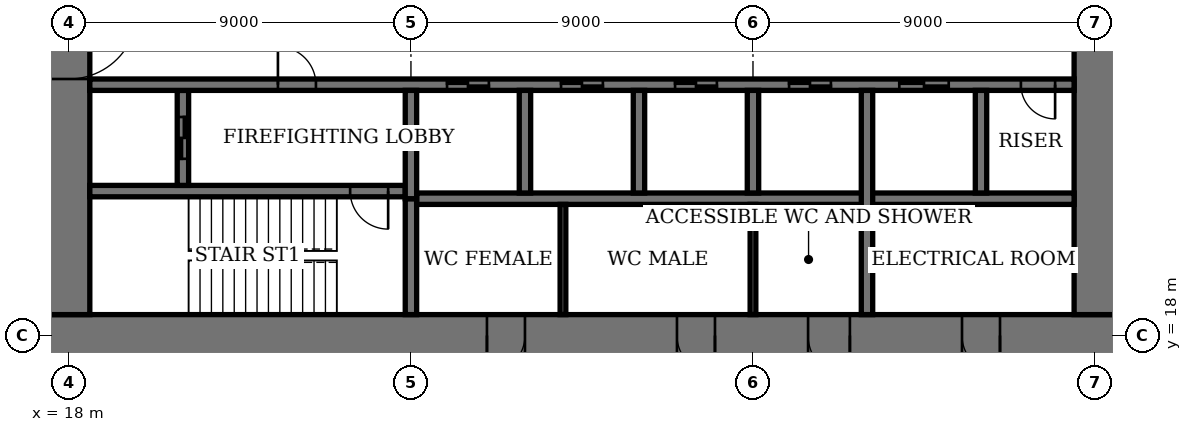
"""IFC4 building model, lengths in metres.
Left out: names, types, materials, properties, quantities, classifications, styles, units other than length and angle.
Written with IfcOpenShell. Run it as: python <this file> out.ifc"""

import sys

from ifc_helpers import new_model, si_unit, direction, frame, frame_2d, origin, place, context, subcontext, project, spatial, rectangle, extrude, element, fill, save


model = new_model("IFC4")
c1 = context("Model", 3, precision=1e-05, world=origin(), true_north=direction((0.0, 1.0)))
c2 = subcontext(c1, "Body", "Model", "MODEL_VIEW")
j1 = project(units=[si_unit("LENGTHUNIT", "METRE"), si_unit("PLANEANGLEUNIT", "RADIAN")], contexts=[c1])
p1 = place(None, origin())
s1 = spatial("IfcSite", under=j1, at=p1, CompositionType="ELEMENT")
p2 = place(p1, origin())
s2 = spatial("IfcBuilding", under=s1, at=p2, CompositionType="ELEMENT")
p3 = place(p2, frame((0.0, 0.0, 239.4)))
s3 = spatial("IfcBuildingStorey", under=s2, at=p3, CompositionType="ELEMENT", Elevation=239.4)
p4 = place(p3, frame((17.45, 18.0, 0.0), z_axis=(0.0, 0.0, 1.0), x_axis=(1.0, 0.0, 0.0)))
e1 = element("IfcWall", 1, at=p4, inside=s3, PredefinedType="SHEAR", context=c2, shape_type="SweptSolid", body=[
    extrude(rectangle(XDim=28.1, YDim=1.1, at=frame_2d((14.05, 0.0))), origin(), (0.0, 0.0, 1.0), 4.0),
])
p5 = place(p4, frame((11.55, 0.0, 0.0)))
e2 = element("IfcOpeningElement", 2, at=p5, cuts=e1, PredefinedType="OPENING", context=c2, shape_type="SweptSolid", body=[
    extrude(rectangle(XDim=1.0, YDim=2.4, at=frame_2d((0.5, 1.2))), frame((0.0, 0.56, 0.0), z_axis=(0.0, -1.0, 0.0), x_axis=(1.0, 0.0, 0.0)), (0.0, 0.0, 1.0), 1.12),
])
p6 = place(p4, frame((16.55, 0.0, 0.0)))
e3 = element("IfcOpeningElement", 3, at=p6, cuts=e1, PredefinedType="OPENING", context=c2, shape_type="SweptSolid", body=[
    extrude(rectangle(XDim=1.0, YDim=2.4, at=frame_2d((0.5, 1.2))), frame((0.0, 0.56, 0.0), z_axis=(0.0, -1.0, 0.0), x_axis=(1.0, 0.0, 0.0)), (0.0, 0.0, 1.0), 1.12),
])
p7 = place(p4, frame((20.0, 0.0, 0.0)))
e4 = element("IfcOpeningElement", 4, at=p7, cuts=e1, PredefinedType="OPENING", context=c2, shape_type="SweptSolid", body=[
    extrude(rectangle(XDim=1.1, YDim=2.4, at=frame_2d((0.55, 1.2))), frame((0.0, 0.56, 0.0), z_axis=(0.0, -1.0, 0.0), x_axis=(1.0, 0.0, 0.0)), (0.0, 0.0, 1.0), 1.12),
])
p8 = place(p4, frame((24.05, 0.0, 0.0)))
e5 = element("IfcOpeningElement", 5, at=p8, cuts=e1, PredefinedType="OPENING", context=c2, shape_type="SweptSolid", body=[
    extrude(rectangle(XDim=1.0, YDim=2.4, at=frame_2d((0.5, 1.2))), frame((0.0, 0.56, 0.0), z_axis=(0.0, -1.0, 0.0), x_axis=(1.0, 0.0, 0.0)), (0.0, 0.0, 1.0), 1.12),
])
p9 = place(p3, frame((18.0, 35.45, 0.0), z_axis=(0.0, 0.0, 1.0), x_axis=(0.0, -1.0, 0.0)))
e6 = element("IfcWall", 6, at=p9, inside=s3, PredefinedType="SHEAR", context=c2, shape_type="SweptSolid", body=[
    extrude(rectangle(XDim=16.9, YDim=1.1, at=frame_2d((8.45, 0.0))), origin(), (0.0, 0.0, 1.0), 4.0),
])
p10 = place(p9, frame((8.9, 0.0, 0.0)))
e7 = element("IfcOpeningElement", 7, at=p10, cuts=e6, PredefinedType="OPENING", context=c2, shape_type="SweptSolid", body=[
    extrude(rectangle(XDim=1.8, YDim=2.4, at=frame_2d((0.9, 1.2))), frame((0.0, 0.56, 0.0), z_axis=(0.0, -1.0, 0.0), x_axis=(1.0, 0.0, 0.0)), (0.0, 0.0, 1.0), 1.12),
])
p11 = place(p3, frame((45.0, 18.55, 0.0), z_axis=(0.0, 0.0, 1.0), x_axis=(0.0, 1.0, 0.0)))
e8 = element("IfcWall", 8, at=p11, inside=s3, PredefinedType="SHEAR", context=c2, shape_type="SweptSolid", body=[
    extrude(rectangle(XDim=16.9, YDim=1.1, at=frame_2d((8.45, 0.0))), origin(), (0.0, 0.0, 1.0), 4.0),
])
p12 = place(p11, frame((8.9, 0.0, 0.0)))
e9 = element("IfcOpeningElement", 9, at=p12, cuts=e8, PredefinedType="OPENING", context=c2, shape_type="SweptSolid", body=[
    extrude(rectangle(XDim=1.8, YDim=2.4, at=frame_2d((0.9, 1.2))), frame((0.0, 0.56, 0.0), z_axis=(0.0, -1.0, 0.0), x_axis=(1.0, 0.0, 0.0)), (0.0, 0.0, 1.0), 1.12),
])
p13 = place(p3, frame((18.55, 21.8, 0.0), z_axis=(0.0, 0.0, 1.0), x_axis=(1.0, 0.0, 0.0)))
e10 = element("IfcWall", 10, at=p13, inside=s3, PredefinedType="SHEAR", context=c2, shape_type="SweptSolid", body=[
    extrude(rectangle(XDim=8.3, YDim=0.3, at=frame_2d((4.15, 0.0))), origin(), (0.0, 0.0, 1.0), 4.0),
])
p14 = place(p13, frame((6.85, 0.0, 0.0)))
e11 = element("IfcOpeningElement", 11, at=p14, cuts=e10, PredefinedType="OPENING", context=c2, shape_type="SweptSolid", body=[
    extrude(rectangle(XDim=1.0, YDim=2.4, at=frame_2d((0.5, 1.2))), frame((0.0, 0.16, 0.0), z_axis=(0.0, -1.0, 0.0), x_axis=(1.0, 0.0, 0.0)), (0.0, 0.0, 1.0), 0.32),
])
p15 = place(p3, frame((27.0, 18.55, 0.0), z_axis=(0.0, 0.0, 1.0), x_axis=(0.0, 1.0, 0.0)))
e12 = element("IfcWall", 12, at=p15, inside=s3, PredefinedType="SHEAR", context=c2, shape_type="SweptSolid", body=[
    extrude(rectangle(XDim=3.05, YDim=0.3, at=frame_2d((1.525, 0.0))), origin(), (0.0, 0.0, 1.0), 4.0),
])
p16 = place(p3, frame((21.0, 21.95, 0.0), z_axis=(0.0, 0.0, 1.0), x_axis=(0.0, 1.0, 0.0)))
e13 = element("IfcWall", 13, at=p16, inside=s3, PredefinedType="SHEAR", context=c2, shape_type="SweptSolid", body=[
    extrude(rectangle(XDim=2.5, YDim=0.3, at=frame_2d((1.25, 0.0))), origin(), (0.0, 0.0, 1.0), 4.0),
])
p17 = place(p16, frame((0.7, 0.0, 0.0)))
e14 = element("IfcOpeningElement", 14, at=p17, cuts=e13, PredefinedType="OPENING", context=c2, shape_type="SweptSolid", body=[
    extrude(rectangle(XDim=1.1, YDim=2.4, at=frame_2d((0.55, 1.2))), frame((0.0, 0.16, 0.0), z_axis=(0.0, -1.0, 0.0), x_axis=(1.0, 0.0, 0.0)), (0.0, 0.0, 1.0), 0.32),
])
p18 = place(p3, frame((18.55, 24.6, 0.0), z_axis=(0.0, 0.0, 1.0), x_axis=(1.0, 0.0, 0.0)))
e15 = element("IfcWall", 15, at=p18, inside=s3, PredefinedType="SHEAR", context=c2, shape_type="SweptSolid", body=[
    extrude(rectangle(XDim=25.9, YDim=0.3, at=frame_2d((12.95, 0.0))), origin(), (0.0, 0.0, 1.0), 4.0),
])
p19 = place(p18, frame((4.95, 0.0, 0.0)))
e16 = element("IfcOpeningElement", 16, at=p19, cuts=e15, PredefinedType="OPENING", context=c2, shape_type="SweptSolid", body=[
    extrude(rectangle(XDim=1.0, YDim=2.4, at=frame_2d((0.5, 1.2))), frame((0.0, 0.16, 0.0), z_axis=(0.0, -1.0, 0.0), x_axis=(1.0, 0.0, 0.0)), (0.0, 0.0, 1.0), 0.32),
])
p20 = place(p18, frame((24.5, 0.0, 0.0)))
e17 = element("IfcOpeningElement", 17, at=p20, cuts=e15, PredefinedType="OPENING", context=c2, shape_type="SweptSolid", body=[
    extrude(rectangle(XDim=0.9, YDim=2.1, at=frame_2d((0.45, 1.05))), frame((0.0, 0.16, 0.0), z_axis=(0.0, -1.0, 0.0), x_axis=(1.0, 0.0, 0.0)), (0.0, 0.0, 1.0), 0.32),
])
p21 = place(p18, frame((9.4, 0.0, 0.0)))
e18 = element("IfcOpeningElement", 18, at=p21, cuts=e15, PredefinedType="OPENING", context=c2, shape_type="SweptSolid", body=[
    extrude(rectangle(XDim=1.1, YDim=2.4, at=frame_2d((0.55, 1.2))), frame((0.0, 0.16, 0.0), z_axis=(0.0, -1.0, 0.0), x_axis=(1.0, 0.0, 0.0)), (0.0, 0.0, 1.0), 0.32),
])
p22 = place(p18, frame((12.4, 0.0, 0.0)))
e19 = element("IfcOpeningElement", 19, at=p22, cuts=e15, PredefinedType="OPENING", context=c2, shape_type="SweptSolid", body=[
    extrude(rectangle(XDim=1.1, YDim=2.4, at=frame_2d((0.55, 1.2))), frame((0.0, 0.16, 0.0), z_axis=(0.0, -1.0, 0.0), x_axis=(1.0, 0.0, 0.0)), (0.0, 0.0, 1.0), 0.32),
])
p23 = place(p18, frame((15.4, 0.0, 0.0)))
e20 = element("IfcOpeningElement", 20, at=p23, cuts=e15, PredefinedType="OPENING", context=c2, shape_type="SweptSolid", body=[
    extrude(rectangle(XDim=1.1, YDim=2.4, at=frame_2d((0.55, 1.2))), frame((0.0, 0.16, 0.0), z_axis=(0.0, -1.0, 0.0), x_axis=(1.0, 0.0, 0.0)), (0.0, 0.0, 1.0), 0.32),
])
p24 = place(p18, frame((18.4, 0.0, 0.0)))
e21 = element("IfcOpeningElement", 21, at=p24, cuts=e15, PredefinedType="OPENING", context=c2, shape_type="SweptSolid", body=[
    extrude(rectangle(XDim=1.1, YDim=2.4, at=frame_2d((0.55, 1.2))), frame((0.0, 0.16, 0.0), z_axis=(0.0, -1.0, 0.0), x_axis=(1.0, 0.0, 0.0)), (0.0, 0.0, 1.0), 0.32),
])
p25 = place(p18, frame((21.3, 0.0, 0.0)))
e22 = element("IfcOpeningElement", 22, at=p25, cuts=e15, PredefinedType="OPENING", context=c2, shape_type="SweptSolid", body=[
    extrude(rectangle(XDim=1.3, YDim=2.4, at=frame_2d((0.65, 1.2))), frame((0.0, 0.16, 0.0), z_axis=(0.0, -1.0, 0.0), x_axis=(1.0, 0.0, 0.0)), (0.0, 0.0, 1.0), 0.32),
])
p26 = place(p3, frame((27.15, 21.6, 0.0), z_axis=(0.0, 0.0, 1.0), x_axis=(1.0, 0.0, 0.0)))
e23 = element("IfcWall", 23, at=p26, inside=s3, PredefinedType="SHEAR", context=c2, shape_type="SweptSolid", body=[
    extrude(rectangle(XDim=17.3, YDim=0.3, at=frame_2d((8.65, 0.0))), origin(), (0.0, 0.0, 1.0), 4.0),
])
for number, where, z_axis, x_axis in (
    (24, (30.0, 21.75, 0.0), (0.0, 0.0, 1.0), (0.0, 1.0, 0.0)),
    (25, (33.0, 21.75, 0.0), (0.0, 0.0, 1.0), (0.0, 1.0, 0.0)),
    (26, (36.0, 21.75, 0.0), (0.0, 0.0, 1.0), (0.0, 1.0, 0.0)),
):
    element("IfcWall", number, at=place(p3, frame(where, z_axis=z_axis, x_axis=x_axis)), inside=s3, PredefinedType="SHEAR", context=c2, shape_type="SweptSolid", body=[
        extrude(rectangle(XDim=2.7, YDim=0.3, at=frame_2d((1.35, 0.0))), origin(), (0.0, 0.0, 1.0), 4.0),
    ])
p27 = place(p3, frame((39.0, 18.55, 0.0), z_axis=(0.0, 0.0, 1.0), x_axis=(0.0, 1.0, 0.0)))
e27 = element("IfcWall", 27, at=p27, inside=s3, PredefinedType="SHEAR", context=c2, shape_type="SweptSolid", body=[
    extrude(rectangle(XDim=5.9, YDim=0.3, at=frame_2d((2.95, 0.0))), origin(), (0.0, 0.0, 1.0), 4.0),
])
p28 = place(p3, frame((42.0, 21.75, 0.0), z_axis=(0.0, 0.0, 1.0), x_axis=(0.0, 1.0, 0.0)))
e28 = element("IfcWall", 28, at=p28, inside=s3, PredefinedType="SHEAR", context=c2, shape_type="SweptSolid", body=[
    extrude(rectangle(XDim=2.7, YDim=0.3, at=frame_2d((1.35, 0.0))), origin(), (0.0, 0.0, 1.0), 4.0),
])
p29 = place(p3, frame((27.0, 21.6, 0.0), z_axis=(0.0, 0.0, 1.0), x_axis=(0.0, 1.0, 0.0)))
e29 = element("IfcWall", 29, at=p29, inside=s3, PredefinedType="SHEAR", context=c2, shape_type="SweptSolid", body=[
    extrude(rectangle(XDim=2.85, YDim=0.3, at=frame_2d((1.425, 0.0))), origin(), (0.0, 0.0, 1.0), 4.0),
])
for number, where, z_axis, x_axis in (
    (30, (31.0, 18.55, 0.0), (0.0, 0.0, 1.0), (0.0, 1.0, 0.0)),
    (31, (36.0, 18.55, 0.0), (0.0, 0.0, 1.0), (0.0, 1.0, 0.0)),
):
    element("IfcWall", number, at=place(p3, frame(where, z_axis=z_axis, x_axis=x_axis)), inside=s3, PredefinedType="PARTITIONING", context=c2, shape_type="SweptSolid", body=[
        extrude(rectangle(XDim=2.9, YDim=0.15, at=frame_2d((1.45, 0.0))), origin(), (0.0, 0.0, 1.0), 3.75),
    ])
p30 = place(p10, origin())
e32 = element("IfcDoor", 32, at=p30, inside=s3, OperationType="DOUBLE_DOOR_DOUBLE_SWING", PredefinedType="DOOR", context=c2, shape_type="SweptSolid", body=[
    extrude(rectangle(XDim=1.8, YDim=2.4, at=frame_2d((0.9, 1.2))), frame((0.0, 0.03, 0.0), z_axis=(0.0, -1.0, 0.0), x_axis=(1.0, 0.0, 0.0)), (0.0, 0.0, 1.0), 0.06),
    extrude(rectangle(XDim=0.04, YDim=2.4, at=frame_2d((0.02, 1.2))), frame((0.0, 0.55, 0.0), z_axis=(0.0, -1.0, 0.0), x_axis=(1.0, 0.0, 0.0)), (0.0, 0.0, 1.0), 1.1),
    extrude(rectangle(XDim=0.04, YDim=2.4, at=frame_2d((1.78, 1.2))), frame((0.0, 0.55, 0.0), z_axis=(0.0, -1.0, 0.0), x_axis=(1.0, 0.0, 0.0)), (0.0, 0.0, 1.0), 1.1),
    extrude(rectangle(XDim=1.8, YDim=0.04, at=frame_2d((0.9, 2.38))), frame((0.0, 0.55, 0.0), z_axis=(0.0, -1.0, 0.0), x_axis=(1.0, 0.0, 0.0)), (0.0, 0.0, 1.0), 1.1),
])
fill(e7, e32)
p31 = place(p5, origin())
e33 = element("IfcDoor", 33, at=p31, inside=s3, OperationType="SINGLE_SWING_LEFT", PredefinedType="DOOR", context=c2, shape_type="SweptSolid", body=[
    extrude(rectangle(XDim=1.0, YDim=2.4, at=frame_2d((0.5, 1.2))), frame((0.0, 0.025, 0.0), z_axis=(0.0, -1.0, 0.0), x_axis=(1.0, 0.0, 0.0)), (0.0, 0.0, 1.0), 0.05),
    extrude(rectangle(XDim=0.04, YDim=2.4, at=frame_2d((0.02, 1.2))), frame((0.0, 0.4, 0.0), z_axis=(0.0, -1.0, 0.0), x_axis=(1.0, 0.0, 0.0)), (0.0, 0.0, 1.0), 0.8),
    extrude(rectangle(XDim=0.04, YDim=2.4, at=frame_2d((0.98, 1.2))), frame((0.0, 0.4, 0.0), z_axis=(0.0, -1.0, 0.0), x_axis=(1.0, 0.0, 0.0)), (0.0, 0.0, 1.0), 0.8),
    extrude(rectangle(XDim=1.0, YDim=0.04, at=frame_2d((0.5, 2.38))), frame((0.0, 0.4, 0.0), z_axis=(0.0, -1.0, 0.0), x_axis=(1.0, 0.0, 0.0)), (0.0, 0.0, 1.0), 0.8),
])
fill(e2, e33)
p32 = place(p6, origin())
e34 = element("IfcDoor", 34, at=p32, inside=s3, OperationType="SINGLE_SWING_RIGHT", PredefinedType="DOOR", context=c2, shape_type="SweptSolid", body=[
    extrude(rectangle(XDim=1.0, YDim=2.4, at=frame_2d((0.5, 1.2))), frame((0.0, 0.025, 0.0), z_axis=(0.0, -1.0, 0.0), x_axis=(1.0, 0.0, 0.0)), (0.0, 0.0, 1.0), 0.05),
    extrude(rectangle(XDim=0.04, YDim=2.4, at=frame_2d((0.02, 1.2))), frame((0.0, 0.4, 0.0), z_axis=(0.0, -1.0, 0.0), x_axis=(1.0, 0.0, 0.0)), (0.0, 0.0, 1.0), 0.8),
    extrude(rectangle(XDim=0.04, YDim=2.4, at=frame_2d((0.98, 1.2))), frame((0.0, 0.4, 0.0), z_axis=(0.0, -1.0, 0.0), x_axis=(1.0, 0.0, 0.0)), (0.0, 0.0, 1.0), 0.8),
    extrude(rectangle(XDim=1.0, YDim=0.04, at=frame_2d((0.5, 2.38))), frame((0.0, 0.4, 0.0), z_axis=(0.0, -1.0, 0.0), x_axis=(1.0, 0.0, 0.0)), (0.0, 0.0, 1.0), 0.8),
])
fill(e3, e34)
p33 = place(p7, origin())
e35 = element("IfcDoor", 35, at=p33, inside=s3, OperationType="SINGLE_SWING_RIGHT", PredefinedType="DOOR", context=c2, shape_type="SweptSolid", body=[
    extrude(rectangle(XDim=1.1, YDim=2.4, at=frame_2d((0.55, 1.2))), frame((0.0, 0.025, 0.0), z_axis=(0.0, -1.0, 0.0), x_axis=(1.0, 0.0, 0.0)), (0.0, 0.0, 1.0), 0.05),
    extrude(rectangle(XDim=0.04, YDim=2.4, at=frame_2d((0.02, 1.2))), frame((0.0, 0.44, 0.0), z_axis=(0.0, -1.0, 0.0), x_axis=(1.0, 0.0, 0.0)), (0.0, 0.0, 1.0), 0.88),
    extrude(rectangle(XDim=0.04, YDim=2.4, at=frame_2d((1.08, 1.2))), frame((0.0, 0.44, 0.0), z_axis=(0.0, -1.0, 0.0), x_axis=(1.0, 0.0, 0.0)), (0.0, 0.0, 1.0), 0.88),
    extrude(rectangle(XDim=1.1, YDim=0.04, at=frame_2d((0.55, 2.38))), frame((0.0, 0.44, 0.0), z_axis=(0.0, -1.0, 0.0), x_axis=(1.0, 0.0, 0.0)), (0.0, 0.0, 1.0), 0.88),
])
fill(e4, e35)
p34 = place(p8, origin())
e36 = element("IfcDoor", 36, at=p34, inside=s3, OperationType="SINGLE_SWING_RIGHT", PredefinedType="DOOR", context=c2, shape_type="SweptSolid", body=[
    extrude(rectangle(XDim=1.0, YDim=2.4, at=frame_2d((0.5, 1.2))), frame((0.0, 0.025, 0.0), z_axis=(0.0, -1.0, 0.0), x_axis=(1.0, 0.0, 0.0)), (0.0, 0.0, 1.0), 0.05),
    extrude(rectangle(XDim=0.04, YDim=2.4, at=frame_2d((0.02, 1.2))), frame((0.0, 0.4, 0.0), z_axis=(0.0, -1.0, 0.0), x_axis=(1.0, 0.0, 0.0)), (0.0, 0.0, 1.0), 0.8),
    extrude(rectangle(XDim=0.04, YDim=2.4, at=frame_2d((0.98, 1.2))), frame((0.0, 0.4, 0.0), z_axis=(0.0, -1.0, 0.0), x_axis=(1.0, 0.0, 0.0)), (0.0, 0.0, 1.0), 0.8),
    extrude(rectangle(XDim=1.0, YDim=0.04, at=frame_2d((0.5, 2.38))), frame((0.0, 0.4, 0.0), z_axis=(0.0, -1.0, 0.0), x_axis=(1.0, 0.0, 0.0)), (0.0, 0.0, 1.0), 0.8),
])
fill(e5, e36)
p35 = place(p14, origin())
e37 = element("IfcDoor", 37, at=p35, inside=s3, OperationType="SINGLE_SWING_RIGHT", PredefinedType="DOOR", context=c2, shape_type="SweptSolid", body=[
    extrude(rectangle(XDim=1.0, YDim=2.4, at=frame_2d((0.5, 1.2))), frame((0.0, 0.03, 0.0), z_axis=(0.0, -1.0, 0.0), x_axis=(1.0, 0.0, 0.0)), (0.0, 0.0, 1.0), 0.06),
])
fill(e11, e37)
p36 = place(p19, origin())
e38 = element("IfcDoor", 38, at=p36, inside=s3, OperationType="SINGLE_SWING_RIGHT", PredefinedType="DOOR", context=c2, shape_type="SweptSolid", body=[
    extrude(rectangle(XDim=1.0, YDim=2.4, at=frame_2d((0.5, 1.2))), frame((0.0, 0.03, 0.0), z_axis=(0.0, -1.0, 0.0), x_axis=(1.0, 0.0, 0.0)), (0.0, 0.0, 1.0), 0.06),
])
fill(e16, e38)
p37 = place(p20, origin())
e39 = element("IfcDoor", 39, at=p37, inside=s3, OperationType="SINGLE_SWING_RIGHT", PredefinedType="DOOR", context=c2, shape_type="SweptSolid", body=[
    extrude(rectangle(XDim=0.9, YDim=2.1, at=frame_2d((0.45, 1.05))), frame((0.0, 0.03, 0.0), z_axis=(0.0, -1.0, 0.0), x_axis=(1.0, 0.0, 0.0)), (0.0, 0.0, 1.0), 0.06),
])
fill(e17, e39)
p38 = place(p21, origin())
e40 = element("IfcDoor", 40, at=p38, inside=s3, OperationType="DOUBLE_DOOR_SLIDING", PredefinedType="DOOR", context=c2, shape_type="SweptSolid", body=[
    extrude(rectangle(XDim=1.1, YDim=2.4, at=frame_2d((0.55, 1.2))), frame((0.0, 0.02, 0.0), z_axis=(0.0, -1.0, 0.0), x_axis=(1.0, 0.0, 0.0)), (0.0, 0.0, 1.0), 0.04),
])
fill(e18, e40)
p39 = place(p22, origin())
e41 = element("IfcDoor", 41, at=p39, inside=s3, OperationType="DOUBLE_DOOR_SLIDING", PredefinedType="DOOR", context=c2, shape_type="SweptSolid", body=[
    extrude(rectangle(XDim=1.1, YDim=2.4, at=frame_2d((0.55, 1.2))), frame((0.0, 0.02, 0.0), z_axis=(0.0, -1.0, 0.0), x_axis=(1.0, 0.0, 0.0)), (0.0, 0.0, 1.0), 0.04),
])
fill(e19, e41)
p40 = place(p23, origin())
e42 = element("IfcDoor", 42, at=p40, inside=s3, OperationType="DOUBLE_DOOR_SLIDING", PredefinedType="DOOR", context=c2, shape_type="SweptSolid", body=[
    extrude(rectangle(XDim=1.1, YDim=2.4, at=frame_2d((0.55, 1.2))), frame((0.0, 0.02, 0.0), z_axis=(0.0, -1.0, 0.0), x_axis=(1.0, 0.0, 0.0)), (0.0, 0.0, 1.0), 0.04),
])
fill(e20, e42)
p41 = place(p24, origin())
e43 = element("IfcDoor", 43, at=p41, inside=s3, OperationType="DOUBLE_DOOR_SLIDING", PredefinedType="DOOR", context=c2, shape_type="SweptSolid", body=[
    extrude(rectangle(XDim=1.1, YDim=2.4, at=frame_2d((0.55, 1.2))), frame((0.0, 0.02, 0.0), z_axis=(0.0, -1.0, 0.0), x_axis=(1.0, 0.0, 0.0)), (0.0, 0.0, 1.0), 0.04),
])
fill(e21, e43)
p42 = place(p25, origin())
e44 = element("IfcDoor", 44, at=p42, inside=s3, OperationType="DOUBLE_DOOR_SLIDING", PredefinedType="DOOR", context=c2, shape_type="SweptSolid", body=[
    extrude(rectangle(XDim=1.3, YDim=2.4, at=frame_2d((0.65, 1.2))), frame((0.0, 0.02, 0.0), z_axis=(0.0, -1.0, 0.0), x_axis=(1.0, 0.0, 0.0)), (0.0, 0.0, 1.0), 0.04),
])
fill(e22, e44)
p43 = place(p17, origin())
e45 = element("IfcDoor", 45, at=p43, inside=s3, OperationType="DOUBLE_DOOR_SLIDING", PredefinedType="DOOR", context=c2, shape_type="SweptSolid", body=[
    extrude(rectangle(XDim=1.1, YDim=2.4, at=frame_2d((0.55, 1.2))), frame((0.0, 0.03, 0.0), z_axis=(0.0, -1.0, 0.0), x_axis=(1.0, 0.0, 0.0)), (0.0, 0.0, 1.0), 0.06),
])
fill(e14, e45)
save(model, sys.argv[1])
